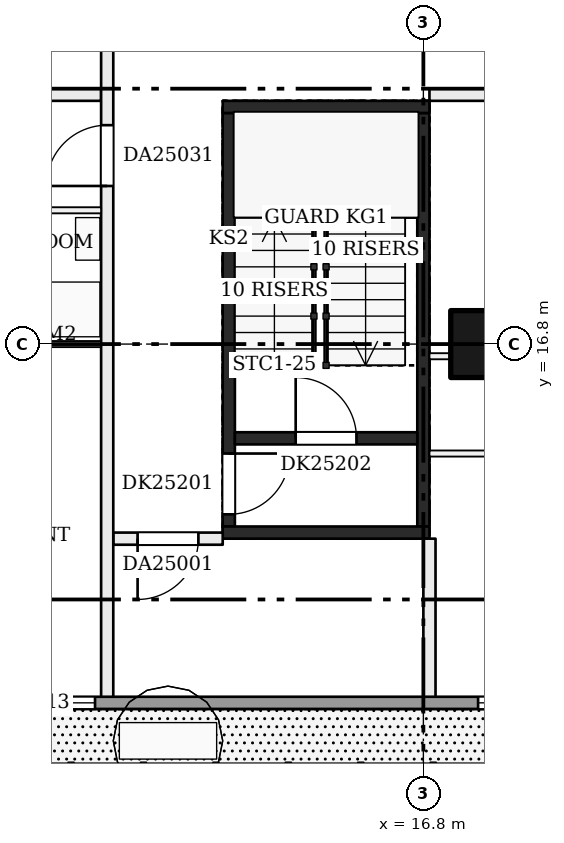
"""IFC4 building model, lengths in metres.
Left out: names, types, materials, properties, quantities, classifications, styles, units other than length and angle.
Written with IfcOpenShell. Run it as: python <this file> out.ifc"""

import sys

from ifc_helpers import new_model, si_unit, direction, frame, frame_2d, origin, origin_2d, place, context, subcontext, project, spatial, rectangle, extrude, element, fill, save


model = new_model("IFC4")
c1 = context("Model", 3, precision=1e-05, world=origin(), true_north=direction((0.0, 1.0)))
c2 = subcontext(c1, "Body", "Model", "MODEL_VIEW")
j1 = project(units=[si_unit("LENGTHUNIT", "METRE"), si_unit("PLANEANGLEUNIT", "RADIAN")], contexts=[c1])
p1 = place(None, origin())
s1 = spatial("IfcSite", under=j1, at=p1, CompositionType="ELEMENT")
p2 = place(p1, origin())
s2 = spatial("IfcBuilding", under=s1, at=p2, CompositionType="ELEMENT")
p3 = place(p2, frame((0.0, 0.0, 102.2)))
s3 = spatial("IfcBuildingStorey", under=s2, at=p3, CompositionType="ELEMENT", Elevation=102.2)
p4 = place(p3, frame((17.8, 16.8, 0.0), z_axis=(0.0, 0.0, 1.0), x_axis=(1.0, 0.0, 0.0)))
e1 = element("IfcColumn", 1, at=p4, inside=s3, PredefinedType="COLUMN", context=c2, shape_type="SweptSolid", body=[
    extrude(rectangle(XDim=1.1, YDim=1.1, at=origin_2d()), origin(), (0.0, 0.0, 1.0), 3.22),
])
p5 = place(p3, frame((13.6, 13.8, 0.0), z_axis=(0.0, 0.0, 1.0), x_axis=(0.0, 1.0, 0.0)))
e2 = element("IfcWall", 2, at=p5, inside=s3, PredefinedType="SHEAR", context=c2, shape_type="SweptSolid", body=[
    extrude(rectangle(XDim=6.8, YDim=0.2, at=frame_2d((3.4, 0.0))), origin(), (0.0, 0.0, 1.0), 3.22),
])
p6 = place(p5, frame((0.2, 0.0, 0.0)))
e3 = element("IfcOpeningElement", 3, at=p6, cuts=e2, PredefinedType="OPENING", context=c2, shape_type="SweptSolid", body=[
    extrude(rectangle(XDim=1.0, YDim=2.1, at=frame_2d((0.5, 1.05))), frame((0.0, 0.11, 0.0), z_axis=(0.0, -1.0, 0.0), x_axis=(1.0, 0.0, 0.0)), (0.0, 0.0, 1.0), 0.22),
])
p7 = place(p3, frame((16.8, 13.8, 0.0), z_axis=(0.0, 0.0, 1.0), x_axis=(0.0, 1.0, 0.0)))
e4 = element("IfcWall", 4, at=p7, inside=s3, PredefinedType="SHEAR", context=c2, shape_type="SweptSolid", body=[
    extrude(rectangle(XDim=6.8, YDim=0.2, at=frame_2d((3.4, 0.0))), origin(), (0.0, 0.0, 1.0), 3.22),
])
for number, where, z_axis, x_axis in (
    (5, (13.5, 13.7, 0.0), (0.0, 0.0, 1.0), (1.0, 0.0, 0.0)),
    (6, (13.5, 20.7, 0.0), (0.0, 0.0, 1.0), (1.0, 0.0, 0.0)),
):
    element("IfcWall", number, at=place(p3, frame(where, z_axis=z_axis, x_axis=x_axis)), inside=s3, PredefinedType="SHEAR", context=c2, shape_type="SweptSolid", body=[
        extrude(rectangle(XDim=3.4, YDim=0.2, at=frame_2d((1.7, 0.0))), origin(), (0.0, 0.0, 1.0), 3.22),
    ])
p8 = place(p3, frame((13.7, 15.25, 0.0), z_axis=(0.0, 0.0, 1.0), x_axis=(1.0, 0.0, 0.0)))
e7 = element("IfcWall", 7, at=p8, inside=s3, PredefinedType="SHEAR", context=c2, shape_type="SweptSolid", body=[
    extrude(rectangle(XDim=3.0, YDim=0.2, at=frame_2d((1.5, 0.0))), origin(), (0.0, 0.0, 1.0), 3.22),
])
p9 = place(p8, frame((1.0, 0.0, 0.0)))
e8 = element("IfcOpeningElement", 8, at=p9, cuts=e7, PredefinedType="OPENING", context=c2, shape_type="SweptSolid", body=[
    extrude(rectangle(XDim=1.0, YDim=2.1, at=frame_2d((0.5, 1.05))), frame((0.0, 0.11, 0.0), z_axis=(0.0, -1.0, 0.0), x_axis=(1.0, 0.0, 0.0)), (0.0, 0.0, 1.0), 0.22),
])
p10 = place(p3, frame((11.7, 13.6, 0.0), z_axis=(0.0, 0.0, 1.0), x_axis=(1.0, 0.0, 0.0)))
e9 = element("IfcWall", 9, at=p10, inside=s3, PredefinedType="PARTITIONING", context=c2, shape_type="SweptSolid", body=[
    extrude(rectangle(XDim=1.8, YDim=0.2, at=frame_2d((0.9, 0.0))), origin(), (0.0, 0.0, 1.0), 3.22),
])
p11 = place(p10, frame((0.4, 0.0, 0.0)))
e10 = element("IfcOpeningElement", 10, at=p11, cuts=e9, PredefinedType="OPENING", context=c2, shape_type="SweptSolid", body=[
    extrude(rectangle(XDim=1.0, YDim=2.1, at=frame_2d((0.5, 1.05))), frame((0.0, 0.11, 0.0), z_axis=(0.0, -1.0, 0.0), x_axis=(1.0, 0.0, 0.0)), (0.0, 0.0, 1.0), 0.22),
])
p12 = place(p3, frame((16.9, 15.0, 0.0), z_axis=(0.0, 0.0, 1.0), x_axis=(1.0, 0.0, 0.0)))
e11 = element("IfcWall", 11, at=p12, inside=s3, PredefinedType="PARTITIONING", context=c2, shape_type="SweptSolid", body=[
    extrude(rectangle(XDim=23.1, YDim=0.1, at=frame_2d((11.55, 0.0))), origin(), (0.0, 0.0, 1.0), 3.22),
])
p13 = place(p12, frame((1.6, 0.0, 0.0)))
e12 = element("IfcOpeningElement", 12, at=p13, cuts=e11, PredefinedType="OPENING", context=c2, shape_type="SweptSolid", body=[
    extrude(rectangle(XDim=0.9, YDim=2.1, at=frame_2d((0.45, 1.05))), frame((0.0, 0.06, 0.0), z_axis=(0.0, -1.0, 0.0), x_axis=(1.0, 0.0, 0.0)), (0.0, 0.0, 1.0), 0.12),
])
p14 = place(p12, frame((5.8, 0.0, 0.0)))
e13 = element("IfcOpeningElement", 13, at=p14, cuts=e11, PredefinedType="OPENING", context=c2, shape_type="SweptSolid", body=[
    extrude(rectangle(XDim=0.9, YDim=2.1, at=frame_2d((0.45, 1.05))), frame((0.0, 0.06, 0.0), z_axis=(0.0, -1.0, 0.0), x_axis=(1.0, 0.0, 0.0)), (0.0, 0.0, 1.0), 0.12),
])
p15 = place(p12, frame((9.9, 0.0, 0.0)))
e14 = element("IfcOpeningElement", 14, at=p15, cuts=e11, PredefinedType="OPENING", context=c2, shape_type="SweptSolid", body=[
    extrude(rectangle(XDim=0.9, YDim=2.1, at=frame_2d((0.45, 1.05))), frame((0.0, 0.06, 0.0), z_axis=(0.0, -1.0, 0.0), x_axis=(1.0, 0.0, 0.0)), (0.0, 0.0, 1.0), 0.12),
])
p16 = place(p12, frame((14.1, 0.0, 0.0)))
e15 = element("IfcOpeningElement", 15, at=p16, cuts=e11, PredefinedType="OPENING", context=c2, shape_type="SweptSolid", body=[
    extrude(rectangle(XDim=0.9, YDim=2.1, at=frame_2d((0.45, 1.05))), frame((0.0, 0.06, 0.0), z_axis=(0.0, -1.0, 0.0), x_axis=(1.0, 0.0, 0.0)), (0.0, 0.0, 1.0), 0.12),
])
p17 = place(p12, frame((19.5, 0.0, 0.0)))
e16 = element("IfcOpeningElement", 16, at=p17, cuts=e11, PredefinedType="OPENING", context=c2, shape_type="SweptSolid", body=[
    extrude(rectangle(XDim=0.9, YDim=2.1, at=frame_2d((0.45, 1.05))), frame((0.0, 0.06, 0.0), z_axis=(0.0, -1.0, 0.0), x_axis=(1.0, 0.0, 0.0)), (0.0, 0.0, 1.0), 0.12),
])
p18 = place(p3, frame((16.9, 16.6, 0.0), z_axis=(0.0, 0.0, 1.0), x_axis=(1.0, 0.0, 0.0)))
e17 = element("IfcWall", 17, at=p18, inside=s3, PredefinedType="PARTITIONING", context=c2, shape_type="SweptSolid", body=[
    extrude(rectangle(XDim=23.1, YDim=0.1, at=frame_2d((11.55, 0.0))), origin(), (0.0, 0.0, 1.0), 3.22),
])
p19 = place(p18, frame((2.5, 0.0, 0.0)))
e18 = element("IfcOpeningElement", 18, at=p19, cuts=e17, PredefinedType="OPENING", context=c2, shape_type="SweptSolid", body=[
    extrude(rectangle(XDim=0.9, YDim=2.1, at=frame_2d((0.45, 1.05))), frame((0.0, 0.06, 0.0), z_axis=(0.0, -1.0, 0.0), x_axis=(1.0, 0.0, 0.0)), (0.0, 0.0, 1.0), 0.12),
])
p20 = place(p18, frame((9.05, 0.0, 0.0)))
e19 = element("IfcOpeningElement", 19, at=p20, cuts=e17, PredefinedType="OPENING", context=c2, shape_type="SweptSolid", body=[
    extrude(rectangle(XDim=0.9, YDim=2.1, at=frame_2d((0.45, 1.05))), frame((0.0, 0.06, 0.0), z_axis=(0.0, -1.0, 0.0), x_axis=(1.0, 0.0, 0.0)), (0.0, 0.0, 1.0), 0.12),
])
p21 = place(p18, frame((14.4, 0.0, 0.0)))
e20 = element("IfcOpeningElement", 20, at=p21, cuts=e17, PredefinedType="OPENING", context=c2, shape_type="SweptSolid", body=[
    extrude(rectangle(XDim=0.9, YDim=2.1, at=frame_2d((0.45, 1.05))), frame((0.0, 0.06, 0.0), z_axis=(0.0, -1.0, 0.0), x_axis=(1.0, 0.0, 0.0)), (0.0, 0.0, 1.0), 0.12),
])
p22 = place(p18, frame((19.95, 0.0, 0.0)))
e21 = element("IfcOpeningElement", 21, at=p22, cuts=e17, PredefinedType="OPENING", context=c2, shape_type="SweptSolid", body=[
    extrude(rectangle(XDim=0.9, YDim=2.1, at=frame_2d((0.45, 1.05))), frame((0.0, 0.06, 0.0), z_axis=(0.0, -1.0, 0.0), x_axis=(1.0, 0.0, 0.0)), (0.0, 0.0, 1.0), 0.12),
])
p23 = place(p3, frame((2.5, 16.8, 0.0), z_axis=(0.0, 0.0, 1.0), x_axis=(1.0, 0.0, 0.0)))
e22 = element("IfcWall", 22, at=p23, inside=s3, PredefinedType="PARTITIONING", context=c2, shape_type="SweptSolid", body=[
    extrude(rectangle(XDim=9.0, YDim=0.1, at=frame_2d((4.5, 0.0))), origin(), (0.0, 0.0, 1.0), 3.22),
])
p24 = place(p23, frame((4.3, 0.0, 0.0)))
e23 = element("IfcOpeningElement", 23, at=p24, cuts=e22, PredefinedType="OPENING", context=c2, shape_type="SweptSolid", body=[
    extrude(rectangle(XDim=0.9, YDim=2.1, at=frame_2d((0.45, 1.05))), frame((0.0, 0.06, 0.0), z_axis=(0.0, -1.0, 0.0), x_axis=(1.0, 0.0, 0.0)), (0.0, 0.0, 1.0), 0.12),
])
p25 = place(p3, frame((8.05, 19.0, 0.0), z_axis=(0.0, 0.0, 1.0), x_axis=(1.0, 0.0, 0.0)))
e24 = element("IfcWall", 24, at=p25, inside=s3, PredefinedType="PARTITIONING", context=c2, shape_type="SweptSolid", body=[
    extrude(rectangle(XDim=3.45, YDim=0.1, at=frame_2d((1.725, 0.0))), origin(), (0.0, 0.0, 1.0), 3.22),
])
p26 = place(p3, frame((2.5, 20.9, 0.0), z_axis=(0.0, 0.0, 1.0), x_axis=(1.0, 0.0, 0.0)))
e25 = element("IfcWall", 25, at=p26, inside=s3, PredefinedType="PARTITIONING", context=c2, shape_type="SweptSolid", body=[
    extrude(rectangle(XDim=9.0, YDim=0.2, at=frame_2d((4.5, 0.0))), origin(), (0.0, 0.0, 1.0), 3.22),
])
p27 = place(p3, frame((16.9, 20.9, 0.0), z_axis=(0.0, 0.0, 1.0), x_axis=(1.0, 0.0, 0.0)))
e26 = element("IfcWall", 26, at=p27, inside=s3, PredefinedType="PARTITIONING", context=c2, shape_type="SweptSolid", body=[
    extrude(rectangle(XDim=23.3, YDim=0.2, at=frame_2d((11.65, 0.0))), origin(), (0.0, 0.0, 1.0), 3.22),
])
p28 = place(p27, frame((2.5, 0.0, 0.0)))
e27 = element("IfcOpeningElement", 27, at=p28, cuts=e26, PredefinedType="OPENING", context=c2, shape_type="SweptSolid", body=[
    extrude(rectangle(XDim=1.0, YDim=2.1, at=frame_2d((0.5, 1.05))), frame((0.0, 0.11, 0.0), z_axis=(0.0, -1.0, 0.0), x_axis=(1.0, 0.0, 0.0)), (0.0, 0.0, 1.0), 0.22),
])
p29 = place(p3, frame((11.6, 10.9, 0.0), z_axis=(0.0, 0.0, 1.0), x_axis=(0.0, 1.0, 0.0)))
e28 = element("IfcWall", 28, at=p29, inside=s3, PredefinedType="PARTITIONING", context=c2, shape_type="SweptSolid", body=[
    extrude(rectangle(XDim=31.1, YDim=0.2, at=frame_2d((15.55, 0.0))), origin(), (0.0, 0.0, 1.0), 3.22),
])
p30 = place(p29, frame((8.5, 0.0, 0.0)))
e29 = element("IfcOpeningElement", 29, at=p30, cuts=e28, PredefinedType="OPENING", context=c2, shape_type="SweptSolid", body=[
    extrude(rectangle(XDim=1.0, YDim=2.1, at=frame_2d((0.5, 1.05))), frame((0.0, 0.11, 0.0), z_axis=(0.0, -1.0, 0.0), x_axis=(1.0, 0.0, 0.0)), (0.0, 0.0, 1.0), 0.22),
])
p31 = place(p29, frame((11.6, 0.0, 0.0)))
e30 = element("IfcOpeningElement", 30, at=p31, cuts=e28, PredefinedType="OPENING", context=c2, shape_type="SweptSolid", body=[
    extrude(rectangle(XDim=1.0, YDim=2.1, at=frame_2d((0.5, 1.05))), frame((0.0, 0.11, 0.0), z_axis=(0.0, -1.0, 0.0), x_axis=(1.0, 0.0, 0.0)), (0.0, 0.0, 1.0), 0.22),
])
p32 = place(p3, frame((16.9, 10.9, 0.0), z_axis=(0.0, 0.0, 1.0), x_axis=(0.0, 1.0, 0.0)))
e31 = element("IfcWall", 31, at=p32, inside=s3, PredefinedType="PARTITIONING", context=c2, shape_type="SweptSolid", body=[
    extrude(rectangle(XDim=2.7, YDim=0.2, at=frame_2d((1.35, 0.0))), origin(), (0.0, 0.0, 1.0), 3.22),
])
p33 = place(p3, frame((4.8, 10.9, 0.0), z_axis=(0.0, 0.0, 1.0), x_axis=(1.0, 0.0, 0.0)))
e32 = element("IfcWall", 32, at=p33, inside=s3, PredefinedType="SOLIDWALL", context=c2, shape_type="SweptSolid", body=[
    extrude(rectangle(XDim=37.2, YDim=0.2, at=frame_2d((18.6, 0.0))), origin(), (0.0, 0.0, 1.0), 3.22),
])
p34 = place(p33, frame((0.3, 0.0, 0.9)))
e33 = element("IfcOpeningElement", 33, at=p34, cuts=e32, PredefinedType="OPENING", context=c2, shape_type="SweptSolid", body=[
    extrude(rectangle(XDim=2.4, YDim=1.5, at=frame_2d((1.2, 0.75))), frame((0.0, 0.11, 0.0), z_axis=(0.0, -1.0, 0.0), x_axis=(1.0, 0.0, 0.0)), (0.0, 0.0, 1.0), 0.22),
])
p35 = place(p33, frame((4.2, 0.0, 0.9)))
e34 = element("IfcOpeningElement", 34, at=p35, cuts=e32, PredefinedType="OPENING", context=c2, shape_type="SweptSolid", body=[
    extrude(rectangle(XDim=2.4, YDim=1.5, at=frame_2d((1.2, 0.75))), frame((0.0, 0.11, 0.0), z_axis=(0.0, -1.0, 0.0), x_axis=(1.0, 0.0, 0.0)), (0.0, 0.0, 1.0), 0.22),
])
p36 = place(p33, frame((12.9, 0.0, 0.9)))
e35 = element("IfcOpeningElement", 35, at=p36, cuts=e32, PredefinedType="OPENING", context=c2, shape_type="SweptSolid", body=[
    extrude(rectangle(XDim=2.4, YDim=1.5, at=frame_2d((1.2, 0.75))), frame((0.0, 0.11, 0.0), z_axis=(0.0, -1.0, 0.0), x_axis=(1.0, 0.0, 0.0)), (0.0, 0.0, 1.0), 0.22),
])
p37 = place(p33, frame((17.1, 0.0, 0.9)))
e36 = element("IfcOpeningElement", 36, at=p37, cuts=e32, PredefinedType="OPENING", context=c2, shape_type="SweptSolid", body=[
    extrude(rectangle(XDim=2.4, YDim=1.5, at=frame_2d((1.2, 0.75))), frame((0.0, 0.11, 0.0), z_axis=(0.0, -1.0, 0.0), x_axis=(1.0, 0.0, 0.0)), (0.0, 0.0, 1.0), 0.22),
])
p38 = place(p33, frame((21.3, 0.0, 0.0)))
e37 = element("IfcOpeningElement", 37, at=p38, cuts=e32, PredefinedType="OPENING", context=c2, shape_type="SweptSolid", body=[
    extrude(rectangle(XDim=2.4, YDim=2.2, at=frame_2d((1.2, 1.1))), frame((0.0, 0.11, 0.0), z_axis=(0.0, -1.0, 0.0), x_axis=(1.0, 0.0, 0.0)), (0.0, 0.0, 1.0), 0.22),
])
p39 = place(p33, frame((25.5, 0.0, 0.9)))
e38 = element("IfcOpeningElement", 38, at=p39, cuts=e32, PredefinedType="OPENING", context=c2, shape_type="SweptSolid", body=[
    extrude(rectangle(XDim=2.4, YDim=1.5, at=frame_2d((1.2, 0.75))), frame((0.0, 0.11, 0.0), z_axis=(0.0, -1.0, 0.0), x_axis=(1.0, 0.0, 0.0)), (0.0, 0.0, 1.0), 0.22),
])
p40 = place(p33, frame((29.7, 0.0, 0.9)))
e39 = element("IfcOpeningElement", 39, at=p40, cuts=e32, PredefinedType="OPENING", context=c2, shape_type="SweptSolid", body=[
    extrude(rectangle(XDim=2.4, YDim=1.5, at=frame_2d((1.2, 0.75))), frame((0.0, 0.11, 0.0), z_axis=(0.0, -1.0, 0.0), x_axis=(1.0, 0.0, 0.0)), (0.0, 0.0, 1.0), 0.22),
])
p41 = place(p33, frame((33.9, 0.0, 0.9)))
e40 = element("IfcOpeningElement", 40, at=p41, cuts=e32, PredefinedType="OPENING", context=c2, shape_type="SweptSolid", body=[
    extrude(rectangle(XDim=1.3, YDim=1.5, at=frame_2d((0.65, 0.75))), frame((0.0, 0.11, 0.0), z_axis=(0.0, -1.0, 0.0), x_axis=(1.0, 0.0, 0.0)), (0.0, 0.0, 1.0), 0.22),
])
p42 = place(p6, frame((1.0, 0.0, 0.0), z_axis=(0.0, 0.0, 1.0), x_axis=(-1.0, 0.0, 0.0)))
e41 = element("IfcDoor", 41, at=p42, inside=s3, OperationType="SINGLE_SWING_LEFT", PredefinedType="DOOR", context=c2, shape_type="SweptSolid", body=[
    extrude(rectangle(XDim=1.0, YDim=2.1, at=frame_2d((0.5, 1.05))), frame((0.0, 0.025, 0.0), z_axis=(0.0, -1.0, 0.0), x_axis=(1.0, 0.0, 0.0)), (0.0, 0.0, 1.0), 0.05),
])
fill(e3, e41)
p43 = place(p9, origin())
e42 = element("IfcDoor", 42, at=p43, inside=s3, OperationType="SINGLE_SWING_LEFT", PredefinedType="DOOR", context=c2, shape_type="SweptSolid", body=[
    extrude(rectangle(XDim=1.0, YDim=2.1, at=frame_2d((0.5, 1.05))), frame((0.0, 0.025, 0.0), z_axis=(0.0, -1.0, 0.0), x_axis=(1.0, 0.0, 0.0)), (0.0, 0.0, 1.0), 0.05),
])
fill(e8, e42)
p44 = place(p11, frame((1.0, 0.0, 0.0), z_axis=(0.0, 0.0, 1.0), x_axis=(-1.0, 0.0, 0.0)))
e43 = element("IfcDoor", 43, at=p44, inside=s3, OperationType="SINGLE_SWING_RIGHT", PredefinedType="DOOR", context=c2, shape_type="SweptSolid", body=[
    extrude(rectangle(XDim=1.0, YDim=2.1, at=frame_2d((0.5, 1.05))), frame((0.0, 0.025, 0.0), z_axis=(0.0, -1.0, 0.0), x_axis=(1.0, 0.0, 0.0)), (0.0, 0.0, 1.0), 0.05),
])
fill(e10, e43)
p45 = place(p30, origin())
e44 = element("IfcDoor", 44, at=p45, inside=s3, OperationType="SINGLE_SWING_LEFT", PredefinedType="DOOR", context=c2, shape_type="SweptSolid", body=[
    extrude(rectangle(XDim=1.0, YDim=2.1, at=frame_2d((0.5, 1.05))), frame((0.0, 0.025, 0.0), z_axis=(0.0, -1.0, 0.0), x_axis=(1.0, 0.0, 0.0)), (0.0, 0.0, 1.0), 0.05),
])
fill(e29, e44)
p46 = place(p35, origin())
e45 = element("IfcWindow", 45, at=p46, inside=s3, PartitioningType="SINGLE_PANEL", PredefinedType="WINDOW", context=c2, shape_type="SweptSolid", body=[
    extrude(rectangle(XDim=2.4, YDim=1.5, at=frame_2d((1.2, 0.75))), frame((0.0, 0.03, 0.0), z_axis=(0.0, -1.0, 0.0), x_axis=(1.0, 0.0, 0.0)), (0.0, 0.0, 1.0), 0.06),
])
fill(e34, e45)
p47 = place(p36, origin())
e46 = element("IfcWindow", 46, at=p47, inside=s3, PartitioningType="SINGLE_PANEL", PredefinedType="WINDOW", context=c2, shape_type="SweptSolid", body=[
    extrude(rectangle(XDim=2.4, YDim=1.5, at=frame_2d((1.2, 0.75))), frame((0.0, 0.03, 0.0), z_axis=(0.0, -1.0, 0.0), x_axis=(1.0, 0.0, 0.0)), (0.0, 0.0, 1.0), 0.06),
])
fill(e35, e46)
save(model, sys.argv[1])
